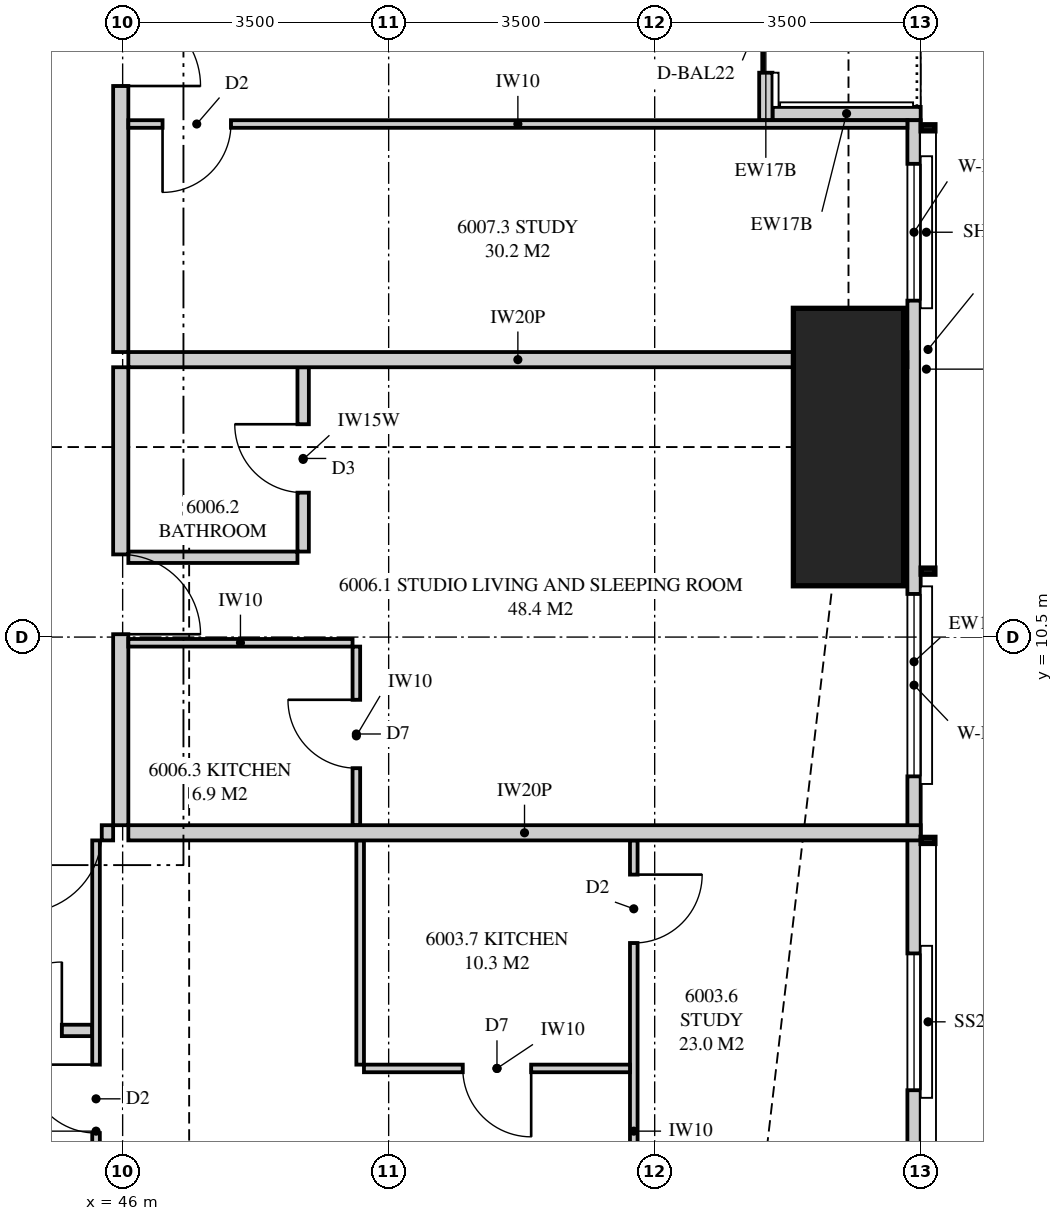
"""IFC4 building model, lengths in metres.
Left out: names, types, materials, properties, quantities, classifications, styles, units other than length and angle.
Written with IfcOpenShell. Run it as: python <this file> out.ifc"""

import sys

from ifc_helpers import new_model, si_unit, direction, frame, frame_2d, origin, origin_2d, place, context, subcontext, project, spatial, polyline, rectangle, outline, extrude, element, fill, save


model = new_model("IFC4")
c1 = context("Model", 3, precision=1e-05, world=origin(), true_north=direction((0.0, 1.0)))
c2 = subcontext(c1, "Body", "Model", "MODEL_VIEW")
j1 = project(units=[si_unit("LENGTHUNIT", "METRE"), si_unit("PLANEANGLEUNIT", "RADIAN")], contexts=[c1])
p1 = place(None, origin())
s1 = spatial("IfcSite", under=j1, at=p1, CompositionType="ELEMENT")
p2 = place(p1, origin())
s2 = spatial("IfcBuilding", under=s1, at=p2, CompositionType="ELEMENT")
p3 = place(p2, frame((0.0, 0.0, 221.45)))
s3 = spatial("IfcBuildingStorey", under=s2, at=p3, CompositionType="ELEMENT", Elevation=221.45)
p4 = place(p3, frame((55.55, 13.0, 0.0), z_axis=(0.0, 0.0, 1.0), x_axis=(1.0, 0.0, 0.0)))
e1 = element("IfcColumn", 1, at=p4, inside=s3, PredefinedType="COLUMN", context=c2, shape_type="SweptSolid", body=[
    extrude(rectangle(XDim=1.45, YDim=3.65, at=origin_2d()), origin(), (0.0, 0.0, 1.0), 3.5),
])
p5 = place(p3, frame((56.413, 3.051, 0.0), z_axis=(0.0, 0.0, 1.0), x_axis=(0.0, 1.0, 0.0)))
e2 = element("IfcWall", 2, at=p5, inside=s3, PredefinedType="SOLIDWALL", context=c2, shape_type="SweptSolid", body=[
    extrude(outline(polyline([(0.0, 0.0), (14.249, 0.0), (14.249, 2.3), (9.949, 2.3), (9.949, 3.26), (9.858, 3.26), (9.858, 2.3), (9.688, 2.3), (9.688, 3.26), (0.0, 3.26), (0.0, 0.0)])), frame((0.0, 0.087, 0.0), z_axis=(0.0, -1.0, 0.0), x_axis=(1.0, 0.0, 0.0)), (0.0, 0.0, 1.0), 0.175),
])
p6 = place(p5, frame((1.487, 0.0, 0.4)))
e3 = element("IfcOpeningElement", 3, at=p6, cuts=e2, PredefinedType="OPENING", context=c2, shape_type="SweptSolid", body=[
    extrude(rectangle(XDim=1.8, YDim=1.85, at=frame_2d((0.9, 0.925))), frame((0.0, 0.097, 0.0), z_axis=(0.0, -1.0, 0.0), x_axis=(1.0, 0.0, 0.0)), (0.0, 0.0, 1.0), 0.195),
])
p7 = place(p5, frame((5.616, 0.0, 0.4)))
e4 = element("IfcOpeningElement", 4, at=p7, cuts=e2, PredefinedType="OPENING", context=c2, shape_type="SweptSolid", body=[
    extrude(rectangle(XDim=2.4, YDim=1.85, at=frame_2d((1.2, 0.925))), frame((0.0, 0.097, 0.0), z_axis=(0.0, -1.0, 0.0), x_axis=(1.0, 0.0, 0.0)), (0.0, 0.0, 1.0), 0.195),
])
p8 = place(p5, frame((11.875, 0.0, 0.4)))
e5 = element("IfcOpeningElement", 5, at=p8, cuts=e2, PredefinedType="OPENING", context=c2, shape_type="SweptSolid", body=[
    extrude(rectangle(XDim=1.8, YDim=1.85, at=frame_2d((0.9, 0.925))), frame((0.0, 0.097, 0.0), z_axis=(0.0, -1.0, 0.0), x_axis=(1.0, 0.0, 0.0)), (0.0, 0.0, 1.0), 0.195),
])
p9 = place(p3, frame((54.462, 17.3, 0.0), z_axis=(0.0, 0.0, 1.0), x_axis=(0.0, 1.0, 0.0)))
e6 = element("IfcWall", 6, at=p9, inside=s3, PredefinedType="SOLIDWALL", context=c2, shape_type="SweptSolid", body=[
    extrude(outline(polyline([(0.0, 0.0), (3.05, 0.0), (3.05, 3.26), (2.65, 3.26), (2.65, 2.66), (0.25, 2.66), (0.25, 3.26), (0.0, 3.26), (0.0, 0.0)])), frame((0.0, 0.087, 0.0), z_axis=(0.0, -1.0, 0.0), x_axis=(1.0, 0.0, 0.0)), (0.0, 0.0, 1.0), 0.175),
])
p10 = place(p9, frame((0.625, 0.0, 0.0)))
e7 = element("IfcOpeningElement", 7, at=p10, cuts=e6, PredefinedType="OPENING", context=c2, shape_type="SweptSolid", body=[
    extrude(rectangle(XDim=1.8, YDim=2.25, at=frame_2d((0.9, 1.125))), frame((0.0, 0.097, 0.0), z_axis=(0.0, -1.0, 0.0), x_axis=(1.0, 0.0, 0.0)), (0.0, 0.0, 1.0), 0.195),
])
p11 = place(p3, frame((56.5, 17.387, 0.0), z_axis=(0.0, 0.0, 1.0), x_axis=(-1.0, 0.0, 0.0)))
e8 = element("IfcWall", 8, at=p11, inside=s3, PredefinedType="SOLIDWALL", context=c2, shape_type="SweptSolid", body=[
    extrude(outline(polyline([(0.0, 0.0), (1.95, 0.0), (1.95, 3.26), (1.75, 3.26), (1.75, 2.3), (0.15, 2.3), (0.15, 3.26), (0.0, 3.26), (0.0, 0.0)])), frame((0.0, 0.087, 0.0), z_axis=(0.0, -1.0, 0.0), x_axis=(1.0, 0.0, 0.0)), (0.0, 0.0, 1.0), 0.175),
])
p12 = place(p3, frame((38.55, 7.925, 0.0), z_axis=(0.0, 0.0, 1.0), x_axis=(1.0, 0.0, 0.0)))
e9 = element("IfcWall", 9, at=p12, inside=s3, PredefinedType="PARTITIONING", context=c2, shape_type="SweptSolid", body=[
    extrude(outline(polyline([(0.0, 0.0), (7.325, 0.0), (7.325, 3.26), (7.325, 2.66), (7.015, 2.66), (7.015, 3.26), (0.01, 3.26), (0.01, 2.66), (0.0, 2.66), (0.0, 3.26), (0.0, 0.0)])), frame((0.0, 0.1, 0.0), z_axis=(0.0, -1.0, 0.0), x_axis=(1.0, 0.0, 0.0)), (0.0, 0.0, 1.0), 0.2),
])
p13 = place(p12, frame((6.125, 0.0, 0.0)))
e10 = element("IfcOpeningElement", 10, at=p13, cuts=e9, PredefinedType="OPENING", context=c2, shape_type="SweptSolid", body=[
    extrude(rectangle(XDim=1.05, YDim=2.2, at=frame_2d((0.525, 1.1))), frame((0.0, 0.11, 0.0), z_axis=(0.0, -1.0, 0.0), x_axis=(1.0, 0.0, 0.0)), (0.0, 0.0, 1.0), 0.22),
])
p14 = place(p3, frame((45.65, 0.175, 0.0), z_axis=(0.0, 0.0, 1.0), x_axis=(0.0, 1.0, 0.0)))
e11 = element("IfcWall", 11, at=p14, inside=s3, PredefinedType="PARTITIONING", context=c2, shape_type="SweptSolid", body=[
    extrude(outline(polyline([(0.529, 2.3), (0.0, 2.3), (0.0, 0.0), (0.529, 0.0), (0.529, 0.252), (1.021, 0.252), (1.021, 0.0), (7.65, 0.0), (7.65, 2.66), (1.635, 2.66), (1.635, 2.3), (1.021, 2.3), (1.021, 2.048), (0.529, 2.048), (0.529, 2.3)])), frame((0.0, 0.05, 0.0), z_axis=(0.0, -1.0, 0.0), x_axis=(1.0, 0.0, 0.0)), (0.0, 0.0, 1.0), 0.1),
])
p15 = place(p14, frame((3.8, 0.0, 0.0)))
e12 = element("IfcOpeningElement", 12, at=p15, cuts=e11, PredefinedType="OPENING", context=c2, shape_type="SweptSolid", body=[
    extrude(rectangle(XDim=0.9, YDim=2.1, at=frame_2d((0.45, 1.05))), frame((0.0, 0.06, 0.0), z_axis=(0.0, -1.0, 0.0), x_axis=(1.0, 0.0, 0.0)), (0.0, 0.0, 1.0), 0.12),
])
p16 = place(p3, frame((42.1, 5.325, 0.0), z_axis=(0.0, 0.0, 1.0), x_axis=(1.0, 0.0, 0.0)))
e13 = element("IfcWall", 13, at=p16, inside=s3, PredefinedType="PLUMBINGWALL", context=c2, shape_type="SweptSolid", body=[
    extrude(outline(polyline([(0.0, 0.0), (3.5, 0.0), (3.5, 3.26), (3.5, 2.66), (3.49, 2.66), (3.49, 3.26), (0.0, 3.26), (0.0, 0.0)])), frame((0.0, 0.075, 0.0), z_axis=(0.0, -1.0, 0.0), x_axis=(1.0, 0.0, 0.0)), (0.0, 0.0, 1.0), 0.15),
])
p17 = place(p16, frame((2.2, 0.0, 0.0)))
e14 = element("IfcOpeningElement", 14, at=p17, cuts=e13, PredefinedType="OPENING", context=c2, shape_type="SweptSolid", body=[
    extrude(rectangle(XDim=0.9, YDim=2.1, at=frame_2d((0.45, 1.05))), frame((0.0, 0.085, 0.0), z_axis=(0.0, -1.0, 0.0), x_axis=(1.0, 0.0, 0.0)), (0.0, 0.0, 1.0), 0.17),
])
p18 = place(p3, frame((52.725, 0.175, 0.0), z_axis=(0.0, 0.0, 1.0), x_axis=(0.0, 1.0, 0.0)))
e15 = element("IfcWall", 15, at=p18, inside=s3, PredefinedType="PARTITIONING", context=c2, shape_type="SweptSolid", body=[
    extrude(outline(polyline([(0.0, 0.0), (7.65, 0.0), (7.65, 3.26), (2.639, 3.26), (2.639, 2.3), (0.894, 2.3), (0.894, 3.26), (0.0, 3.26), (0.0, 0.0)])), frame((0.0, 0.05, 0.0), z_axis=(0.0, -1.0, 0.0), x_axis=(1.0, 0.0, 0.0)), (0.0, 0.0, 1.0), 0.1),
])
p19 = place(p18, frame((6.3, 0.0, 0.0)))
e16 = element("IfcOpeningElement", 16, at=p19, cuts=e15, PredefinedType="OPENING", context=c2, shape_type="SweptSolid", body=[
    extrude(rectangle(XDim=0.9, YDim=2.1, at=frame_2d((0.45, 1.05))), frame((0.0, 0.06, 0.0), z_axis=(0.0, -1.0, 0.0), x_axis=(1.0, 0.0, 0.0)), (0.0, 0.0, 1.0), 0.12),
])
p20 = place(p3, frame((49.175, 4.825, 0.0), z_axis=(0.0, 0.0, 1.0), x_axis=(1.0, 0.0, 0.0)))
e17 = element("IfcWall", 17, at=p20, inside=s3, PredefinedType="PARTITIONING", context=c2, shape_type="SweptSolid", body=[
    extrude(rectangle(XDim=3.5, YDim=0.1, at=frame_2d((1.75, 0.0))), origin(), (0.0, 0.0, 1.0), 3.26),
])
p21 = place(p20, frame((1.3, 0.0, 0.0)))
e18 = element("IfcOpeningElement", 18, at=p21, cuts=e17, PredefinedType="OPENING", context=c2, shape_type="SweptSolid", body=[
    extrude(rectangle(XDim=0.9, YDim=2.1, at=frame_2d((0.45, 1.05))), frame((0.0, 0.06, 0.0), z_axis=(0.0, -1.0, 0.0), x_axis=(1.0, 0.0, 0.0)), (0.0, 0.0, 1.0), 0.12),
])
p22 = place(p3, frame((49.125, 4.875, 0.0), z_axis=(0.0, 0.0, 1.0), x_axis=(0.0, 1.0, 0.0)))
e19 = element("IfcWall", 19, at=p22, inside=s3, PredefinedType="PARTITIONING", context=c2, shape_type="SweptSolid", body=[
    extrude(rectangle(XDim=2.95, YDim=0.1, at=frame_2d((1.475, 0.0))), origin(), (0.0, 0.0, 1.0), 3.26),
])
p23 = place(p3, frame((46.075, 7.925, 0.0), z_axis=(0.0, 0.0, 1.0), x_axis=(1.0, 0.0, 0.0)))
e20 = element("IfcWall", 20, at=p23, inside=s3, PredefinedType="PARTITIONING", context=c2, shape_type="SweptSolid", body=[
    extrude(outline(polyline([(0.0, 0.0), (10.425, 0.0), (10.425, 3.26), (9.8, 3.26), (9.8, 2.3), (7.968, 2.3), (7.968, 3.26), (2.11, 3.26), (2.11, 2.66), (0.0, 2.66), (0.0, 3.26), (0.0, 0.0)])), frame((0.0, 0.1, 0.0), z_axis=(0.0, -1.0, 0.0), x_axis=(1.0, 0.0, 0.0)), (0.0, 0.0, 1.0), 0.2),
])
p24 = place(p3, frame((56.325, 14.15, 0.0), z_axis=(0.0, 0.0, 1.0), x_axis=(-1.0, 0.0, 0.0)))
e21 = element("IfcWall", 21, at=p24, inside=s3, PredefinedType="PARTITIONING", context=c2, shape_type="SweptSolid", body=[
    extrude(outline(polyline([(0.529, 2.3), (0.0, 2.3), (0.0, 0.0), (0.529, 0.0), (0.529, 0.396), (1.021, 0.396), (1.021, 0.0), (10.25, 0.0), (10.25, 2.66), (1.685, 2.66), (1.685, 2.3), (1.021, 2.3), (1.021, 1.904), (0.529, 1.904), (0.529, 2.3)])), frame((0.0, 0.1, 0.0), z_axis=(0.0, -1.0, 0.0), x_axis=(1.0, 0.0, 0.0)), (0.0, 0.0, 1.0), 0.2),
])
p25 = place(p3, frame((45.975, 8.025, 0.0), z_axis=(0.0, 0.0, 1.0), x_axis=(0.0, 1.0, 0.0)))
e22 = element("IfcWall", 22, at=p25, inside=s3, PredefinedType="PARTITIONING", context=c2, shape_type="SweptSolid", body=[
    extrude(outline(polyline([(0.0, 0.0), (6.025, 0.0), (6.025, 3.26), (6.025, 2.66), (5.085, 2.66), (0.0, 2.66), (0.0, 3.26), (0.0, 0.0)])), frame((0.0, 0.1, 0.0), z_axis=(0.0, -1.0, 0.0), x_axis=(1.0, 0.0, 0.0)), (0.0, 0.0, 1.0), 0.2),
])
p26 = place(p25, frame((2.512, 0.0, 0.0)))
e23 = element("IfcOpeningElement", 23, at=p26, cuts=e22, PredefinedType="OPENING", context=c2, shape_type="SweptSolid", body=[
    extrude(rectangle(XDim=1.05, YDim=2.2, at=frame_2d((0.525, 1.1))), frame((0.0, 0.11, 0.0), z_axis=(0.0, -1.0, 0.0), x_axis=(1.0, 0.0, 0.0)), (0.0, 0.0, 1.0), 0.22),
])
p27 = place(p3, frame((48.375, 11.625, 0.0), z_axis=(0.0, 0.0, 1.0), x_axis=(0.0, 1.0, 0.0)))
e24 = element("IfcWall", 24, at=p27, inside=s3, PredefinedType="PLUMBINGWALL", context=c2, shape_type="SweptSolid", body=[
    extrude(outline(polyline([(0.0, 0.0), (2.425, 0.0), (2.425, 3.26), (2.425, 2.66), (0.09, 2.66), (0.09, 3.26), (0.0, 3.26), (0.0, 0.0)])), frame((0.0, 0.075, 0.0), z_axis=(0.0, -1.0, 0.0), x_axis=(1.0, 0.0, 0.0)), (0.0, 0.0, 1.0), 0.15),
])
p28 = place(p27, frame((0.775, 0.0, 0.0)))
e25 = element("IfcOpeningElement", 25, at=p28, cuts=e24, PredefinedType="OPENING", context=c2, shape_type="SweptSolid", body=[
    extrude(rectangle(XDim=0.9, YDim=2.1, at=frame_2d((0.45, 1.05))), frame((0.0, 0.085, 0.0), z_axis=(0.0, -1.0, 0.0), x_axis=(1.0, 0.0, 0.0)), (0.0, 0.0, 1.0), 0.17),
])
p29 = place(p3, frame((48.3, 11.55, 0.0), z_axis=(0.0, 0.0, 1.0), x_axis=(-1.0, 0.0, 0.0)))
e26 = element("IfcWall", 26, at=p29, inside=s3, PredefinedType="PLUMBINGWALL", context=c2, shape_type="SweptSolid", body=[
    extrude(outline(polyline([(0.0, 0.0), (2.225, 0.0), (2.225, 3.26), (2.225, 2.66), (0.14, 2.66), (0.14, 3.26), (0.0, 3.26), (0.0, 0.0)])), frame((0.0, 0.075, 0.0), z_axis=(0.0, -1.0, 0.0), x_axis=(1.0, 0.0, 0.0)), (0.0, 0.0, 1.0), 0.15),
])
p30 = place(p3, frame((49.075, 8.025, 0.0), z_axis=(0.0, 0.0, 1.0), x_axis=(0.0, 1.0, 0.0)))
e27 = element("IfcWall", 27, at=p30, inside=s3, PredefinedType="PARTITIONING", context=c2, shape_type="SweptSolid", body=[
    extrude(rectangle(XDim=2.35, YDim=0.1, at=frame_2d((1.175, 0.0))), origin(), (0.0, 0.0, 1.0), 3.26),
])
p31 = place(p30, frame((0.75, 0.0, 0.0)))
e28 = element("IfcOpeningElement", 28, at=p31, cuts=e27, PredefinedType="OPENING", context=c2, shape_type="SweptSolid", body=[
    extrude(rectangle(XDim=0.9, YDim=2.1, at=frame_2d((0.45, 1.05))), frame((0.0, 0.06, 0.0), z_axis=(0.0, -1.0, 0.0), x_axis=(1.0, 0.0, 0.0)), (0.0, 0.0, 1.0), 0.12),
])
p32 = place(p3, frame((49.025, 10.425, 0.0), z_axis=(0.0, 0.0, 1.0), x_axis=(-1.0, 0.0, 0.0)))
e29 = element("IfcWall", 29, at=p32, inside=s3, PredefinedType="PARTITIONING", context=c2, shape_type="SweptSolid", body=[
    extrude(outline(polyline([(0.0, 0.0), (2.95, 0.0), (2.95, 3.26), (2.95, 2.66), (0.89, 2.66), (0.89, 3.26), (0.0, 3.26), (0.0, 0.0)])), frame((0.0, 0.05, 0.0), z_axis=(0.0, -1.0, 0.0), x_axis=(1.0, 0.0, 0.0)), (0.0, 0.0, 1.0), 0.1),
])
p33 = place(p3, frame((45.975, 14.25, 0.0), z_axis=(0.0, 0.0, 1.0), x_axis=(0.0, 1.0, 0.0)))
e30 = element("IfcWall", 30, at=p33, inside=s3, PredefinedType="PARTITIONING", context=c2, shape_type="SweptSolid", body=[
    extrude(outline(polyline([(0.0, 0.0), (8.0, 0.0), (8.0, 3.26), (5.81, 3.26), (5.81, 2.66), (3.19, 2.66), (3.19, 3.26), (0.06, 3.26), (0.06, 2.66), (0.0, 2.66), (0.0, 3.26), (0.0, 0.0)])), frame((0.0, 0.1, 0.0), z_axis=(0.0, -1.0, 0.0), x_axis=(1.0, 0.0, 0.0)), (0.0, 0.0, 1.0), 0.2),
])
p34 = place(p33, frame((3.5, 0.0, 0.0)))
e31 = element("IfcOpeningElement", 31, at=p34, cuts=e30, PredefinedType="OPENING", context=c2, shape_type="SweptSolid", body=[
    extrude(rectangle(XDim=1.05, YDim=2.2, at=frame_2d((0.525, 1.1))), frame((0.0, 0.11, 0.0), z_axis=(0.0, -1.0, 0.0), x_axis=(1.0, 0.0, 0.0)), (0.0, 0.0, 1.0), 0.22),
])
p35 = place(p3, frame((56.325, 17.25, 0.0), z_axis=(0.0, 0.0, 1.0), x_axis=(-1.0, 0.0, 0.0)))
e32 = element("IfcWall", 32, at=p35, inside=s3, PredefinedType="PARTITIONING", context=c2, shape_type="SweptSolid", body=[
    extrude(outline(polyline([(0.0, 0.0), (10.25, 0.0), (10.25, 3.26), (1.635, 3.26), (1.635, 2.3), (0.0, 2.3), (0.0, 3.26), (0.0, 0.0)])), frame((0.0, 0.05, 0.0), z_axis=(0.0, -1.0, 0.0), x_axis=(1.0, 0.0, 0.0)), (0.0, 0.0, 1.0), 0.1),
])
p36 = place(p35, frame((8.9, 0.0, 0.0)))
e33 = element("IfcOpeningElement", 33, at=p36, cuts=e32, PredefinedType="OPENING", context=c2, shape_type="SweptSolid", body=[
    extrude(rectangle(XDim=0.9, YDim=2.1, at=frame_2d((0.45, 1.05))), frame((0.0, 0.06, 0.0), z_axis=(0.0, -1.0, 0.0), x_axis=(1.0, 0.0, 0.0)), (0.0, 0.0, 1.0), 0.12),
])
p37 = place(p6, origin())
e34 = element("IfcWindow", 34, at=p37, inside=s3, PartitioningType="SINGLE_PANEL", PredefinedType="WINDOW", context=c2, shape_type="SweptSolid", body=[
    extrude(rectangle(XDim=1.8, YDim=1.85, at=frame_2d((0.9, 0.925))), frame((0.0, 0.03, 0.0), z_axis=(0.0, -1.0, 0.0), x_axis=(1.0, 0.0, 0.0)), (0.0, 0.0, 1.0), 0.06),
])
fill(e3, e34)
p38 = place(p7, origin())
e35 = element("IfcWindow", 35, at=p38, inside=s3, PartitioningType="SINGLE_PANEL", PredefinedType="WINDOW", context=c2, shape_type="SweptSolid", body=[
    extrude(rectangle(XDim=2.4, YDim=1.85, at=frame_2d((1.2, 0.925))), frame((0.0, 0.03, 0.0), z_axis=(0.0, -1.0, 0.0), x_axis=(1.0, 0.0, 0.0)), (0.0, 0.0, 1.0), 0.06),
])
fill(e4, e35)
p39 = place(p8, origin())
e36 = element("IfcWindow", 36, at=p39, inside=s3, PartitioningType="SINGLE_PANEL", PredefinedType="WINDOW", context=c2, shape_type="SweptSolid", body=[
    extrude(rectangle(XDim=1.8, YDim=1.85, at=frame_2d((0.9, 0.925))), frame((0.0, 0.03, 0.0), z_axis=(0.0, -1.0, 0.0), x_axis=(1.0, 0.0, 0.0)), (0.0, 0.0, 1.0), 0.06),
])
fill(e5, e36)
p40 = place(p10, origin())
e37 = element("IfcDoor", 37, at=p40, inside=s3, OperationType="SLIDING_TO_LEFT", PredefinedType="DOOR", context=c2, shape_type="SweptSolid", body=[
    extrude(rectangle(XDim=1.8, YDim=2.25, at=frame_2d((0.9, 1.125))), frame((0.0, 0.025, 0.0), z_axis=(0.0, -1.0, 0.0), x_axis=(1.0, 0.0, 0.0)), (0.0, 0.0, 1.0), 0.05),
])
fill(e7, e37)
p41 = place(p13, frame((1.05, 0.0, 0.0), z_axis=(0.0, 0.0, 1.0), x_axis=(-1.0, 0.0, 0.0)))
e38 = element("IfcDoor", 38, at=p41, inside=s3, OperationType="SINGLE_SWING_RIGHT", PredefinedType="DOOR", context=c2, shape_type="SweptSolid", body=[
    extrude(rectangle(XDim=1.05, YDim=2.2, at=frame_2d((0.525, 1.1))), frame((0.0, 0.025, 0.0), z_axis=(0.0, -1.0, 0.0), x_axis=(1.0, 0.0, 0.0)), (0.0, 0.0, 1.0), 0.05),
])
fill(e10, e38)
p42 = place(p15, origin())
e39 = element("IfcDoor", 39, at=p42, inside=s3, OperationType="SINGLE_SWING_RIGHT", PredefinedType="DOOR", context=c2, shape_type="SweptSolid", body=[
    extrude(rectangle(XDim=0.9, YDim=2.1, at=frame_2d((0.45, 1.05))), frame((0.0, 0.025, 0.0), z_axis=(0.0, -1.0, 0.0), x_axis=(1.0, 0.0, 0.0)), (0.0, 0.0, 1.0), 0.05),
])
fill(e12, e39)
p43 = place(p17, origin())
e40 = element("IfcDoor", 40, at=p43, inside=s3, OperationType="SINGLE_SWING_RIGHT", PredefinedType="DOOR", context=c2, shape_type="SweptSolid", body=[
    extrude(rectangle(XDim=0.9, YDim=2.1, at=frame_2d((0.45, 1.05))), frame((0.0, 0.025, 0.0), z_axis=(0.0, -1.0, 0.0), x_axis=(1.0, 0.0, 0.0)), (0.0, 0.0, 1.0), 0.05),
])
fill(e14, e40)
p44 = place(p19, frame((0.9, 0.0, 0.0), z_axis=(0.0, 0.0, 1.0), x_axis=(-1.0, 0.0, 0.0)))
e41 = element("IfcDoor", 41, at=p44, inside=s3, OperationType="SINGLE_SWING_LEFT", PredefinedType="DOOR", context=c2, shape_type="SweptSolid", body=[
    extrude(rectangle(XDim=0.9, YDim=2.1, at=frame_2d((0.45, 1.05))), frame((0.0, 0.025, 0.0), z_axis=(0.0, -1.0, 0.0), x_axis=(1.0, 0.0, 0.0)), (0.0, 0.0, 1.0), 0.05),
])
fill(e16, e41)
p45 = place(p21, frame((0.9, 0.0, 0.0), z_axis=(0.0, 0.0, 1.0), x_axis=(-1.0, 0.0, 0.0)))
e42 = element("IfcDoor", 42, at=p45, inside=s3, OperationType="SINGLE_SWING_LEFT", PredefinedType="DOOR", context=c2, shape_type="SweptSolid", body=[
    extrude(rectangle(XDim=0.9, YDim=2.1, at=frame_2d((0.45, 1.05))), frame((0.0, 0.025, 0.0), z_axis=(0.0, -1.0, 0.0), x_axis=(1.0, 0.0, 0.0)), (0.0, 0.0, 1.0), 0.05),
])
fill(e18, e42)
p46 = place(p26, frame((1.05, 0.0, 0.0), z_axis=(0.0, 0.0, 1.0), x_axis=(-1.0, 0.0, 0.0)))
e43 = element("IfcDoor", 43, at=p46, inside=s3, OperationType="SINGLE_SWING_RIGHT", PredefinedType="DOOR", context=c2, shape_type="SweptSolid", body=[
    extrude(rectangle(XDim=1.05, YDim=2.2, at=frame_2d((0.525, 1.1))), frame((0.0, 0.025, 0.0), z_axis=(0.0, -1.0, 0.0), x_axis=(1.0, 0.0, 0.0)), (0.0, 0.0, 1.0), 0.05),
])
fill(e23, e43)
p47 = place(p28, origin())
e44 = element("IfcDoor", 44, at=p47, inside=s3, OperationType="SINGLE_SWING_RIGHT", PredefinedType="DOOR", context=c2, shape_type="SweptSolid", body=[
    extrude(rectangle(XDim=0.9, YDim=2.1, at=frame_2d((0.45, 1.05))), frame((0.0, 0.025, 0.0), z_axis=(0.0, -1.0, 0.0), x_axis=(1.0, 0.0, 0.0)), (0.0, 0.0, 1.0), 0.05),
])
fill(e25, e44)
p48 = place(p31, origin())
e45 = element("IfcDoor", 45, at=p48, inside=s3, OperationType="SINGLE_SWING_RIGHT", PredefinedType="DOOR", context=c2, shape_type="SweptSolid", body=[
    extrude(rectangle(XDim=0.9, YDim=2.1, at=frame_2d((0.45, 1.05))), frame((0.0, 0.025, 0.0), z_axis=(0.0, -1.0, 0.0), x_axis=(1.0, 0.0, 0.0)), (0.0, 0.0, 1.0), 0.05),
])
fill(e28, e45)
p49 = place(p34, frame((1.05, 0.0, 0.0), z_axis=(0.0, 0.0, 1.0), x_axis=(-1.0, 0.0, 0.0)))
e46 = element("IfcDoor", 46, at=p49, inside=s3, OperationType="SINGLE_SWING_RIGHT", PredefinedType="DOOR", context=c2, shape_type="SweptSolid", body=[
    extrude(rectangle(XDim=1.05, YDim=2.2, at=frame_2d((0.525, 1.1))), frame((0.0, 0.025, 0.0), z_axis=(0.0, -1.0, 0.0), x_axis=(1.0, 0.0, 0.0)), (0.0, 0.0, 1.0), 0.05),
])
fill(e31, e46)
p50 = place(p36, origin())
e47 = element("IfcDoor", 47, at=p50, inside=s3, OperationType="SINGLE_SWING_RIGHT", PredefinedType="DOOR", context=c2, shape_type="SweptSolid", body=[
    extrude(rectangle(XDim=0.9, YDim=2.1, at=frame_2d((0.45, 1.05))), frame((0.0, 0.025, 0.0), z_axis=(0.0, -1.0, 0.0), x_axis=(1.0, 0.0, 0.0)), (0.0, 0.0, 1.0), 0.05),
])
fill(e33, e47)
save(model, sys.argv[1])
